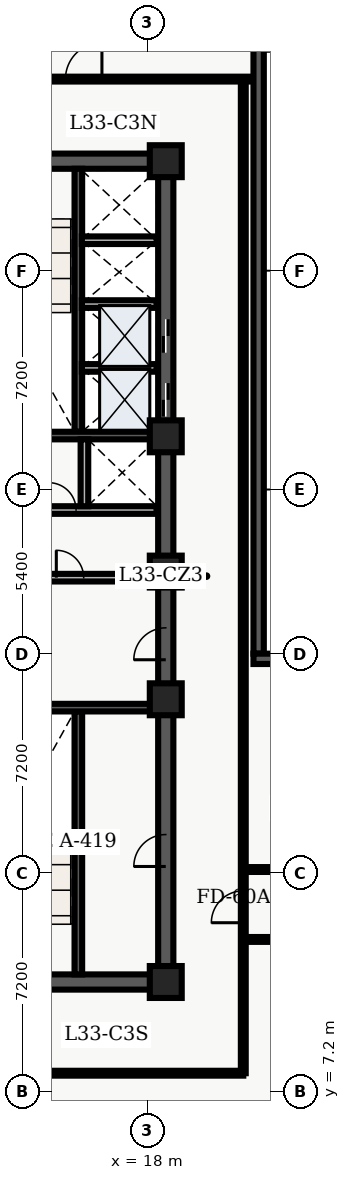
"""IFC4 building model, lengths in metres.
Left out: names, types, materials, properties, quantities, classifications, styles, units other than length and angle.
Written with IfcOpenShell. Run it as: python <this file> out.ifc"""

import sys

from ifc_helpers import new_model, entity, si_unit, converted_unit, direction, frame, origin_with_axes, origin_2d_with_axis, place, context, subcontext, project, spatial, polyline, rectangle, outline, extrude, element, fill, save


model = new_model("IFC4")
c1 = context("Model", 3, precision=1e-05, world=origin_with_axes(), true_north=direction((0.0, 1.0)))
c2 = subcontext(c1, "Body", "Model", "MODEL_VIEW")
j1 = project(units=[si_unit("LENGTHUNIT", "METRE"), converted_unit("PLANEANGLEUNIT", "DEGREE", entity("IfcPlaneAngleMeasure", 0.017), si_unit("PLANEANGLEUNIT", "RADIAN"), dimensions=[0, 0, 0, 0, 0, 0, 0])], contexts=[c1])
p1 = place(None, origin_with_axes())
s1 = spatial("IfcSite", under=j1, at=p1, CompositionType="ELEMENT")
p2 = place(p1, origin_with_axes())
s2 = spatial("IfcBuilding", under=s1, at=p2, CompositionType="ELEMENT")
p3 = place(p2, frame((0.0, 0.0, 136.8), z_axis=(0.0, 0.0, 1.0), x_axis=(1.0, 0.0, 0.0)))
s3 = spatial("IfcBuildingStorey", under=s2, at=p3, CompositionType="ELEMENT", Elevation=136.8)
p4 = place(p3, frame((11.4, 10.8, 0.0), z_axis=(0.0, 0.0, 1.0), x_axis=(1.0, 0.0, 0.0)))
e1 = element("IfcWall", 1, at=p4, inside=s3, PredefinedType="SHEAR", context=c2, shape_type="SweptSolid", body=[
    extrude(outline(polyline([(0.0, -0.25), (7.2, -0.25), (7.2, 0.25), (0.0, 0.25), (0.0, -0.25)])), origin_with_axes(), (0.0, 0.0, 1.0), 3.66),
])
p5 = place(p4, frame((2.625, 0.0, 0.0), z_axis=(0.0, 0.0, 1.0), x_axis=(1.0, 0.0, 0.0)))
e2 = element("IfcOpeningElement", 2, at=p5, cuts=e1, PredefinedType="OPENING", context=c2, shape_type="SweptSolid", body=[
    extrude(rectangle(XDim=1.05, YDim=0.52, at=origin_2d_with_axis()), origin_with_axes(), (0.0, 0.0, 1.0), 2.15),
])
p6 = place(p3, frame((11.4, 37.8, 0.0), z_axis=(0.0, 0.0, 1.0), x_axis=(1.0, 0.0, 0.0)))
e3 = element("IfcWall", 3, at=p6, inside=s3, PredefinedType="SHEAR", context=c2, shape_type="SweptSolid", body=[
    extrude(outline(polyline([(0.0, -0.25), (7.2, -0.25), (7.2, 0.25), (0.0, 0.25), (0.0, -0.25)])), origin_with_axes(), (0.0, 0.0, 1.0), 3.66),
])
p7 = place(p6, frame((2.625, 0.0, 0.0), z_axis=(0.0, 0.0, 1.0), x_axis=(1.0, 0.0, 0.0)))
e4 = element("IfcOpeningElement", 4, at=p7, cuts=e3, PredefinedType="OPENING", context=c2, shape_type="SweptSolid", body=[
    extrude(rectangle(XDim=1.05, YDim=0.52, at=origin_2d_with_axis()), origin_with_axes(), (0.0, 0.0, 1.0), 2.15),
])
p8 = place(p3, frame((18.6, 10.8, 0.0), z_axis=(0.0, 0.0, 1.0), x_axis=(0.0, 1.0, 0.0)))
e5 = element("IfcWall", 5, at=p8, inside=s3, PredefinedType="SHEAR", context=c2, shape_type="SweptSolid", body=[
    extrude(outline(polyline([(0.0, -0.25), (13.5, -0.25), (13.5, 0.25), (0.0, 0.25), (0.0, -0.25)])), origin_with_axes(), (0.0, 0.0, 1.0), 3.66),
])
p9 = place(p8, frame((11.125, 0.0, 0.0), z_axis=(0.0, 0.0, 1.0), x_axis=(1.0, 0.0, 0.0)))
e6 = element("IfcOpeningElement", 6, at=p9, cuts=e5, PredefinedType="OPENING", context=c2, shape_type="SweptSolid", body=[
    extrude(rectangle(XDim=1.05, YDim=0.52, at=origin_2d_with_axis()), origin_with_axes(), (0.0, 0.0, 1.0), 2.15),
])
p10 = place(p8, frame((4.325, 0.0, 0.0), z_axis=(0.0, 0.0, 1.0), x_axis=(1.0, 0.0, 0.0)))
e7 = element("IfcOpeningElement", 7, at=p10, cuts=e5, PredefinedType="OPENING", context=c2, shape_type="SweptSolid", body=[
    extrude(rectangle(XDim=1.05, YDim=0.52, at=origin_2d_with_axis()), origin_with_axes(), (0.0, 0.0, 1.0), 2.15),
])
p11 = place(p3, frame((18.6, 24.3, 0.0), z_axis=(0.0, 0.0, 1.0), x_axis=(0.0, 1.0, 0.0)))
e8 = element("IfcWall", 8, at=p11, inside=s3, PredefinedType="SHEAR", context=c2, shape_type="SweptSolid", body=[
    extrude(outline(polyline([(0.0, -0.25), (13.5, -0.25), (13.5, 0.25), (0.0, 0.25), (0.0, -0.25)])), origin_with_axes(), (0.0, 0.0, 1.0), 3.66),
])
p12 = place(p11, frame((5.65, 0.0, 0.0), z_axis=(0.0, 0.0, 1.0), x_axis=(1.0, 0.0, 0.0)))
e9 = element("IfcOpeningElement", 9, at=p12, cuts=e8, PredefinedType="OPENING", context=c2, shape_type="SweptSolid", body=[
    extrude(rectangle(XDim=1.1, YDim=0.52, at=origin_2d_with_axis()), origin_with_axes(), (0.0, 0.0, 1.0), 2.15),
])
p13 = place(p11, frame((7.75, 0.0, 0.0), z_axis=(0.0, 0.0, 1.0), x_axis=(1.0, 0.0, 0.0)))
e10 = element("IfcOpeningElement", 10, at=p13, cuts=e8, PredefinedType="OPENING", context=c2, shape_type="SweptSolid", body=[
    extrude(rectangle(XDim=1.1, YDim=0.52, at=origin_2d_with_axis()), origin_with_axes(), (0.0, 0.0, 1.0), 2.15),
])
p14 = place(p3, frame((15.725, 11.05, 0.0), z_axis=(0.0, 0.0, 1.0), x_axis=(0.0, 1.0, 0.0)))
e11 = element("IfcWall", 11, at=p14, inside=s3, PredefinedType="SHEAR", context=c2, shape_type="SweptSolid", body=[
    extrude(outline(polyline([(0.0, -0.125), (8.65, -0.125), (8.65, 0.125), (0.0, 0.125), (0.0, -0.125)])), origin_with_axes(), (0.0, 0.0, 1.0), 3.66),
])
p15 = place(p3, frame((11.65, 19.825, 0.0), z_axis=(0.0, 0.0, 1.0), x_axis=(1.0, 0.0, 0.0)))
e12 = element("IfcWall", 12, at=p15, inside=s3, PredefinedType="SHEAR", context=c2, shape_type="SweptSolid", body=[
    extrude(outline(polyline([(0.0, -0.125), (6.7, -0.125), (6.7, 0.125), (0.0, 0.125), (0.0, -0.125)])), origin_with_axes(), (0.0, 0.0, 1.0), 3.66),
])
p16 = place(p3, frame((15.725, 28.9, 0.0), z_axis=(0.0, 0.0, 1.0), x_axis=(0.0, 1.0, 0.0)))
e13 = element("IfcWall", 13, at=p16, inside=s3, PredefinedType="SHEAR", context=c2, shape_type="SweptSolid", body=[
    extrude(outline(polyline([(0.0, -0.125), (8.65, -0.125), (8.65, 0.125), (0.0, 0.125), (0.0, -0.125)])), origin_with_axes(), (0.0, 0.0, 1.0), 3.66),
])
p17 = place(p3, frame((11.65, 28.775, 0.0), z_axis=(0.0, 0.0, 1.0), x_axis=(1.0, 0.0, 0.0)))
e14 = element("IfcWall", 14, at=p17, inside=s3, PredefinedType="SHEAR", context=c2, shape_type="SweptSolid", body=[
    extrude(outline(polyline([(0.0, -0.125), (6.7, -0.125), (6.7, 0.125), (0.0, 0.125), (0.0, -0.125)])), origin_with_axes(), (0.0, 0.0, 1.0), 3.66),
])
p18 = place(p3, frame((11.7, 24.1, 0.0), z_axis=(0.0, 0.0, 1.0), x_axis=(1.0, 0.0, 0.0)))
e15 = element("IfcWall", 15, at=p18, inside=s3, PredefinedType="SOLIDWALL", context=c2, shape_type="SweptSolid", body=[
    extrude(outline(polyline([(0.0, -0.125), (6.6, -0.125), (6.6, 0.125), (0.0, 0.125), (0.0, -0.125)])), origin_with_axes(), (0.0, 0.0, 1.0), 2.7),
])
p19 = place(p18, frame((3.75, 0.0, 0.0), z_axis=(0.0, 0.0, 1.0), x_axis=(1.0, 0.0, 0.0)))
e16 = element("IfcOpeningElement", 16, at=p19, cuts=e15, PredefinedType="OPENING", context=c2, shape_type="SweptSolid", body=[
    extrude(rectangle(XDim=0.9, YDim=0.27, at=origin_2d_with_axis()), origin_with_axes(), (0.0, 0.0, 1.0), 2.15),
])
p20 = place(p3, frame((11.7, 26.325, 0.0), z_axis=(0.0, 0.0, 1.0), x_axis=(1.0, 0.0, 0.0)))
e17 = element("IfcWall", 17, at=p20, inside=s3, PredefinedType="SOLIDWALL", context=c2, shape_type="SweptSolid", body=[
    extrude(outline(polyline([(0.0, -0.125), (6.6, -0.125), (6.6, 0.125), (0.0, 0.125), (0.0, -0.125)])), origin_with_axes(), (0.0, 0.0, 1.0), 2.7),
])
p21 = place(p20, frame((3.5, 0.0, 0.0), z_axis=(0.0, 0.0, 1.0), x_axis=(1.0, 0.0, 0.0)))
e18 = element("IfcOpeningElement", 18, at=p21, cuts=e17, PredefinedType="OPENING", context=c2, shape_type="SweptSolid", body=[
    extrude(rectangle(XDim=0.9, YDim=0.27, at=origin_2d_with_axis()), origin_with_axes(), (0.0, 0.0, 1.0), 2.15),
])
p22 = place(p3, frame((15.925, 26.45, 0.0), z_axis=(0.0, 0.0, 1.0), x_axis=(0.0, 1.0, 0.0)))
e19 = element("IfcWall", 19, at=p22, inside=s3, PredefinedType="SOLIDWALL", context=c2, shape_type="SweptSolid", body=[
    extrude(outline(polyline([(0.0, -0.125), (2.2, -0.125), (2.2, 0.125), (0.0, 0.125), (0.0, -0.125)])), origin_with_axes(), (0.0, 0.0, 1.0), 2.7),
])
for number, where, z_axis, x_axis in (
    (20, (18.6, 10.8, 0.0), (0.0, 0.0, 1.0), (1.0, 0.0, 0.0)),
    (21, (18.6, 20.1, 0.0), (0.0, 0.0, 1.0), (1.0, 0.0, 0.0)),
    (22, (18.6, 24.3, 0.0), (0.0, 0.0, 1.0), (1.0, 0.0, 0.0)),
    (23, (18.6, 28.75, 0.0), (0.0, 0.0, 1.0), (1.0, 0.0, 0.0)),
    (24, (18.6, 37.8, 0.0), (0.0, 0.0, 1.0), (1.0, 0.0, 0.0)),
):
    element("IfcColumn", number, at=place(p3, frame(where, z_axis=z_axis, x_axis=x_axis)), inside=s3, PredefinedType="COLUMN", context=c2, shape_type="SweptSolid", body=[
        extrude(rectangle(XDim=1.05, YDim=1.05, at=origin_2d_with_axis()), origin_with_axes(), (0.0, 0.0, 1.0), 3.9),
    ])
for number, where, z_axis, x_axis in (
    (25, (15.84, 31.0, 0.0), (0.0, 0.0, 1.0), (1.0, 0.0, 0.0)),
    (26, (15.84, 33.1, 0.0), (0.0, 0.0, 1.0), (1.0, 0.0, 0.0)),
    (27, (15.84, 35.2, 0.0), (0.0, 0.0, 1.0), (1.0, 0.0, 0.0)),
):
    element("IfcWall", number, at=place(p3, frame(where, z_axis=z_axis, x_axis=x_axis)), inside=s3, PredefinedType="SOLIDWALL", context=c2, shape_type="SweptSolid", body=[
        extrude(outline(polyline([(0.0, -0.125), (2.46, -0.125), (2.46, 0.125), (0.0, 0.125), (0.0, -0.125)])), origin_with_axes(), (0.0, 0.0, 1.0), 2.7),
    ])
p23 = place(p3, frame((2.6, 7.8, 0.0), z_axis=(0.0, 0.0, 1.0), x_axis=(1.0, 0.0, 0.0)))
e28 = element("IfcWall", 28, at=p23, inside=s3, PredefinedType="PARTITIONING", context=c2, shape_type="SweptSolid", body=[
    extrude(outline(polyline([(0.0, -0.08), (18.55, -0.08), (18.55, 0.08), (0.0, 0.08), (0.0, -0.08)])), origin_with_axes(), (0.0, 0.0, 1.0), 2.7),
])
p24 = place(p23, frame((9.245, 0.0, 0.0), z_axis=(0.0, 0.0, 1.0), x_axis=(1.0, 0.0, 0.0)))
e29 = element("IfcOpeningElement", 29, at=p24, cuts=e28, PredefinedType="OPENING", context=c2, shape_type="SweptSolid", body=[
    extrude(rectangle(XDim=1.2, YDim=0.18, at=origin_2d_with_axis()), origin_with_axes(), (0.0, 0.0, 1.0), 2.2),
])
p25 = place(p3, frame((2.6, 40.5, 0.0), z_axis=(0.0, 0.0, 1.0), x_axis=(1.0, 0.0, 0.0)))
e30 = element("IfcWall", 30, at=p25, inside=s3, PredefinedType="PARTITIONING", context=c2, shape_type="SweptSolid", body=[
    extrude(outline(polyline([(0.0, -0.08), (18.89, -0.08), (18.89, 0.08), (0.0, 0.08), (0.0, -0.08)])), origin_with_axes(), (0.0, 0.0, 1.0), 2.7),
])
p26 = place(p25, frame((1.057, 0.0, 0.0), z_axis=(0.0, 0.0, 1.0), x_axis=(1.0, 0.0, 0.0)))
e31 = element("IfcOpeningElement", 31, at=p26, cuts=e30, PredefinedType="OPENING", context=c2, shape_type="SweptSolid", body=[
    extrude(rectangle(XDim=1.0, YDim=0.18, at=origin_2d_with_axis()), origin_with_axes(), (0.0, 0.0, 1.0), 2.15),
])
p27 = place(p25, frame((6.022, 0.0, 0.0), z_axis=(0.0, 0.0, 1.0), x_axis=(1.0, 0.0, 0.0)))
e32 = element("IfcOpeningElement", 32, at=p27, cuts=e30, PredefinedType="OPENING", context=c2, shape_type="SweptSolid", body=[
    extrude(rectangle(XDim=1.0, YDim=0.18, at=origin_2d_with_axis()), origin_with_axes(), (0.0, 0.0, 1.0), 2.15),
])
p28 = place(p25, frame((13.3, 0.0, 0.0), z_axis=(0.0, 0.0, 1.0), x_axis=(1.0, 0.0, 0.0)))
e33 = element("IfcOpeningElement", 33, at=p28, cuts=e30, PredefinedType="OPENING", context=c2, shape_type="SweptSolid", body=[
    extrude(rectangle(XDim=1.2, YDim=0.18, at=origin_2d_with_axis()), origin_with_axes(), (0.0, 0.0, 1.0), 2.2),
])
p29 = place(p3, frame((21.15, 7.8, 0.0), z_axis=(0.0, 0.0, 1.0), x_axis=(0.0, 1.0, 0.0)))
e34 = element("IfcWall", 34, at=p29, inside=s3, PredefinedType="PARTITIONING", context=c2, shape_type="SweptSolid", body=[
    extrude(outline(polyline([(0.0, -0.08), (32.7, -0.08), (32.7, 0.08), (0.0, 0.08), (0.0, -0.08)])), origin_with_axes(), (0.0, 0.0, 1.0), 2.7),
])
p30 = place(p29, frame((5.475, 0.0, 0.0), z_axis=(0.0, 0.0, 1.0), x_axis=(1.0, 0.0, 0.0)))
e35 = element("IfcOpeningElement", 35, at=p30, cuts=e34, PredefinedType="OPENING", context=c2, shape_type="SweptSolid", body=[
    extrude(rectangle(XDim=1.05, YDim=0.18, at=origin_2d_with_axis()), origin_with_axes(), (0.0, 0.0, 1.0), 2.15),
])
p31 = place(p3, frame((21.15, 12.2, 0.0), z_axis=(0.0, 0.0, 1.0), x_axis=(1.0, 0.0, 0.0)))
e36 = element("IfcWall", 36, at=p31, inside=s3, PredefinedType="PARTITIONING", context=c2, shape_type="SweptSolid", body=[
    extrude(outline(polyline([(0.0, -0.08), (15.2, -0.08), (15.2, 0.08), (0.0, 0.08), (0.0, -0.08)])), origin_with_axes(), (0.0, 0.0, 1.0), 2.7),
])
p32 = place(p31, frame((3.315, 0.0, 0.0), z_axis=(0.0, 0.0, 1.0), x_axis=(1.0, 0.0, 0.0)))
e37 = element("IfcOpeningElement", 37, at=p32, cuts=e36, PredefinedType="OPENING", context=c2, shape_type="SweptSolid", body=[
    extrude(rectangle(XDim=1.0, YDim=0.18, at=origin_2d_with_axis()), origin_with_axes(), (0.0, 0.0, 1.0), 2.15),
])
p33 = place(p31, frame((7.624, 0.0, 0.0), z_axis=(0.0, 0.0, 1.0), x_axis=(1.0, 0.0, 0.0)))
e38 = element("IfcOpeningElement", 38, at=p33, cuts=e36, PredefinedType="OPENING", context=c2, shape_type="SweptSolid", body=[
    extrude(rectangle(XDim=1.0, YDim=0.18, at=origin_2d_with_axis()), origin_with_axes(), (0.0, 0.0, 1.0), 2.15),
])
p34 = place(p31, frame((10.288, 0.0, 0.0), z_axis=(0.0, 0.0, 1.0), x_axis=(1.0, 0.0, 0.0)))
e39 = element("IfcOpeningElement", 39, at=p34, cuts=e36, PredefinedType="OPENING", context=c2, shape_type="SweptSolid", body=[
    extrude(rectangle(XDim=1.0, YDim=0.18, at=origin_2d_with_axis()), origin_with_axes(), (0.0, 0.0, 1.0), 2.15),
])
p35 = place(p31, frame((13.169, 0.0, 0.0), z_axis=(0.0, 0.0, 1.0), x_axis=(1.0, 0.0, 0.0)))
e40 = element("IfcOpeningElement", 40, at=p35, cuts=e36, PredefinedType="OPENING", context=c2, shape_type="SweptSolid", body=[
    extrude(rectangle(XDim=1.0, YDim=0.18, at=origin_2d_with_axis()), origin_with_axes(), (0.0, 0.0, 1.0), 2.15),
])
p36 = place(p3, frame((21.15, 14.5, 0.0), z_axis=(0.0, 0.0, 1.0), x_axis=(1.0, 0.0, 0.0)))
e41 = element("IfcWall", 41, at=p36, inside=s3, PredefinedType="PARTITIONING", context=c2, shape_type="SweptSolid", body=[
    extrude(outline(polyline([(0.0, -0.08), (15.2, -0.08), (15.2, 0.08), (0.0, 0.08), (0.0, -0.08)])), origin_with_axes(), (0.0, 0.0, 1.0), 2.7),
])
p37 = place(p36, frame((7.65, 0.0, 0.0), z_axis=(0.0, 0.0, 1.0), x_axis=(1.0, 0.0, 0.0)))
e42 = element("IfcOpeningElement", 42, at=p37, cuts=e41, PredefinedType="OPENING", context=c2, shape_type="SweptSolid", body=[
    extrude(rectangle(XDim=1.2, YDim=0.18, at=origin_2d_with_axis()), origin_with_axes(), (0.0, 0.0, 1.0), 2.2),
])
p38 = place(p3, frame((21.655, 46.58, 0.0), z_axis=(0.0, 0.0, 1.0), x_axis=(0.0, -1.0, 0.0)))
e43 = element("IfcWall", 43, at=p38, inside=s3, PredefinedType="SOLIDWALL", context=c2, shape_type="SweptSolid", body=[
    extrude(outline(polyline([(0.0, -0.17), (24.98, -0.17), (24.98, 0.17), (0.0, 0.17), (0.0, -0.17)])), origin_with_axes(), (0.0, 0.0, 1.0), 3.66),
])
p39 = place(p38, frame((2.978, 0.0, 0.45), z_axis=(0.0, 0.0, 1.0), x_axis=(1.0, 0.0, 0.0)))
e44 = element("IfcOpeningElement", 44, at=p39, cuts=e43, PredefinedType="OPENING", context=c2, shape_type="SweptSolid", body=[
    extrude(rectangle(XDim=1.6, YDim=0.36, at=origin_2d_with_axis()), origin_with_axes(), (0.0, 0.0, 1.0), 2.2),
])
p40 = place(p3, frame((21.485, 21.43, 0.0), z_axis=(0.0, 0.0, 1.0), x_axis=(1.0, 0.0, 0.0)))
e45 = element("IfcWall", 45, at=p40, inside=s3, PredefinedType="SOLIDWALL", context=c2, shape_type="SweptSolid", body=[
    extrude(outline(polyline([(0.0, -0.17), (16.915, -0.17), (16.915, 0.17), (0.0, 0.17), (0.0, -0.17)])), origin_with_axes(), (0.0, 0.0, 1.0), 3.66),
])
p41 = place(p40, frame((3.219, 0.0, 0.45), z_axis=(0.0, 0.0, 1.0), x_axis=(1.0, 0.0, 0.0)))
e46 = element("IfcOpeningElement", 46, at=p41, cuts=e45, PredefinedType="OPENING", context=c2, shape_type="SweptSolid", body=[
    extrude(rectangle(XDim=1.8, YDim=0.36, at=origin_2d_with_axis()), origin_with_axes(), (0.0, 0.0, 1.0), 2.1),
])
p42 = place(p40, frame((8.457, 0.0, 0.45), z_axis=(0.0, 0.0, 1.0), x_axis=(1.0, 0.0, 0.0)))
e47 = element("IfcOpeningElement", 47, at=p42, cuts=e45, PredefinedType="OPENING", context=c2, shape_type="SweptSolid", body=[
    extrude(rectangle(XDim=1.8, YDim=0.36, at=origin_2d_with_axis()), origin_with_axes(), (0.0, 0.0, 1.0), 2.1),
])
p43 = place(p40, frame((13.246, 0.0, 0.45), z_axis=(0.0, 0.0, 1.0), x_axis=(1.0, 0.0, 0.0)))
e48 = element("IfcOpeningElement", 48, at=p43, cuts=e45, PredefinedType="OPENING", context=c2, shape_type="SweptSolid", body=[
    extrude(rectangle(XDim=1.8, YDim=0.36, at=origin_2d_with_axis()), origin_with_axes(), (0.0, 0.0, 1.0), 2.1),
])
p44 = place(p11, frame((5.65, 0.0, 0.0), z_axis=(0.0, 0.0, 1.0), x_axis=(1.0, 0.0, 0.0)))
e49 = element("IfcDoor", 49, at=p44, inside=s3, OperationType="SLIDING_TO_LEFT", PredefinedType="DOOR", context=c2, shape_type="SweptSolid", body=[
    extrude(rectangle(XDim=1.1, YDim=0.09, at=origin_2d_with_axis()), origin_with_axes(), (0.0, 0.0, 1.0), 2.15),
])
fill(e9, e49)
p45 = place(p11, frame((7.75, 0.0, 0.0), z_axis=(0.0, 0.0, 1.0), x_axis=(1.0, 0.0, 0.0)))
e50 = element("IfcDoor", 50, at=p45, inside=s3, OperationType="SLIDING_TO_RIGHT", PredefinedType="DOOR", context=c2, shape_type="SweptSolid", body=[
    extrude(rectangle(XDim=1.1, YDim=0.09, at=origin_2d_with_axis()), origin_with_axes(), (0.0, 0.0, 1.0), 2.15),
])
fill(e10, e50)
p46 = place(p8, frame((11.125, 0.0, 0.0), z_axis=(0.0, 0.0, 1.0), x_axis=(1.0, 0.0, 0.0)))
e51 = element("IfcDoor", 51, at=p46, inside=s3, OperationType="SINGLE_SWING_LEFT", PredefinedType="DOOR", context=c2, shape_type="SweptSolid", body=[
    extrude(rectangle(XDim=1.05, YDim=0.09, at=origin_2d_with_axis()), origin_with_axes(), (0.0, 0.0, 1.0), 2.15),
])
fill(e6, e51)
p47 = place(p18, frame((3.75, 0.0, 0.0), z_axis=(0.0, 0.0, 1.0), x_axis=(1.0, 0.0, 0.0)))
e52 = element("IfcDoor", 52, at=p47, inside=s3, OperationType="SINGLE_SWING_LEFT", PredefinedType="DOOR", context=c2, shape_type="SweptSolid", body=[
    extrude(rectangle(XDim=0.9, YDim=0.09, at=origin_2d_with_axis()), origin_with_axes(), (0.0, 0.0, 1.0), 2.15),
])
fill(e16, e52)
p48 = place(p20, frame((3.5, 0.0, 0.0), z_axis=(0.0, 0.0, 1.0), x_axis=(1.0, 0.0, 0.0)))
e53 = element("IfcDoor", 53, at=p48, inside=s3, OperationType="SINGLE_SWING_LEFT", PredefinedType="DOOR", context=c2, shape_type="SweptSolid", body=[
    extrude(rectangle(XDim=0.9, YDim=0.09, at=origin_2d_with_axis()), origin_with_axes(), (0.0, 0.0, 1.0), 2.15),
])
fill(e18, e53)
p49 = place(p8, frame((4.325, 0.0, 0.0), z_axis=(0.0, 0.0, 1.0), x_axis=(1.0, 0.0, 0.0)))
e54 = element("IfcDoor", 54, at=p49, inside=s3, OperationType="SINGLE_SWING_LEFT", PredefinedType="DOOR", context=c2, shape_type="SweptSolid", body=[
    extrude(rectangle(XDim=1.05, YDim=0.09, at=origin_2d_with_axis()), origin_with_axes(), (0.0, 0.0, 1.0), 2.15),
])
fill(e7, e54)
p50 = place(p25, frame((13.3, 0.0, 0.0), z_axis=(0.0, 0.0, 1.0), x_axis=(1.0, 0.0, 0.0)))
e55 = element("IfcDoor", 55, at=p50, inside=s3, OperationType="SINGLE_SWING_RIGHT", PredefinedType="DOOR", context=c2, shape_type="SweptSolid", body=[
    extrude(rectangle(XDim=1.2, YDim=0.09, at=origin_2d_with_axis()), origin_with_axes(), (0.0, 0.0, 1.0), 2.2),
])
fill(e33, e55)
p51 = place(p29, frame((5.475, 0.0, 0.0), z_axis=(0.0, 0.0, 1.0), x_axis=(1.0, 0.0, 0.0)))
e56 = element("IfcDoor", 56, at=p51, inside=s3, OperationType="SINGLE_SWING_LEFT", PredefinedType="DOOR", context=c2, shape_type="SweptSolid", body=[
    extrude(rectangle(XDim=1.05, YDim=0.09, at=origin_2d_with_axis()), origin_with_axes(), (0.0, 0.0, 1.0), 2.15),
])
fill(e35, e56)
save(model, sys.argv[1])
